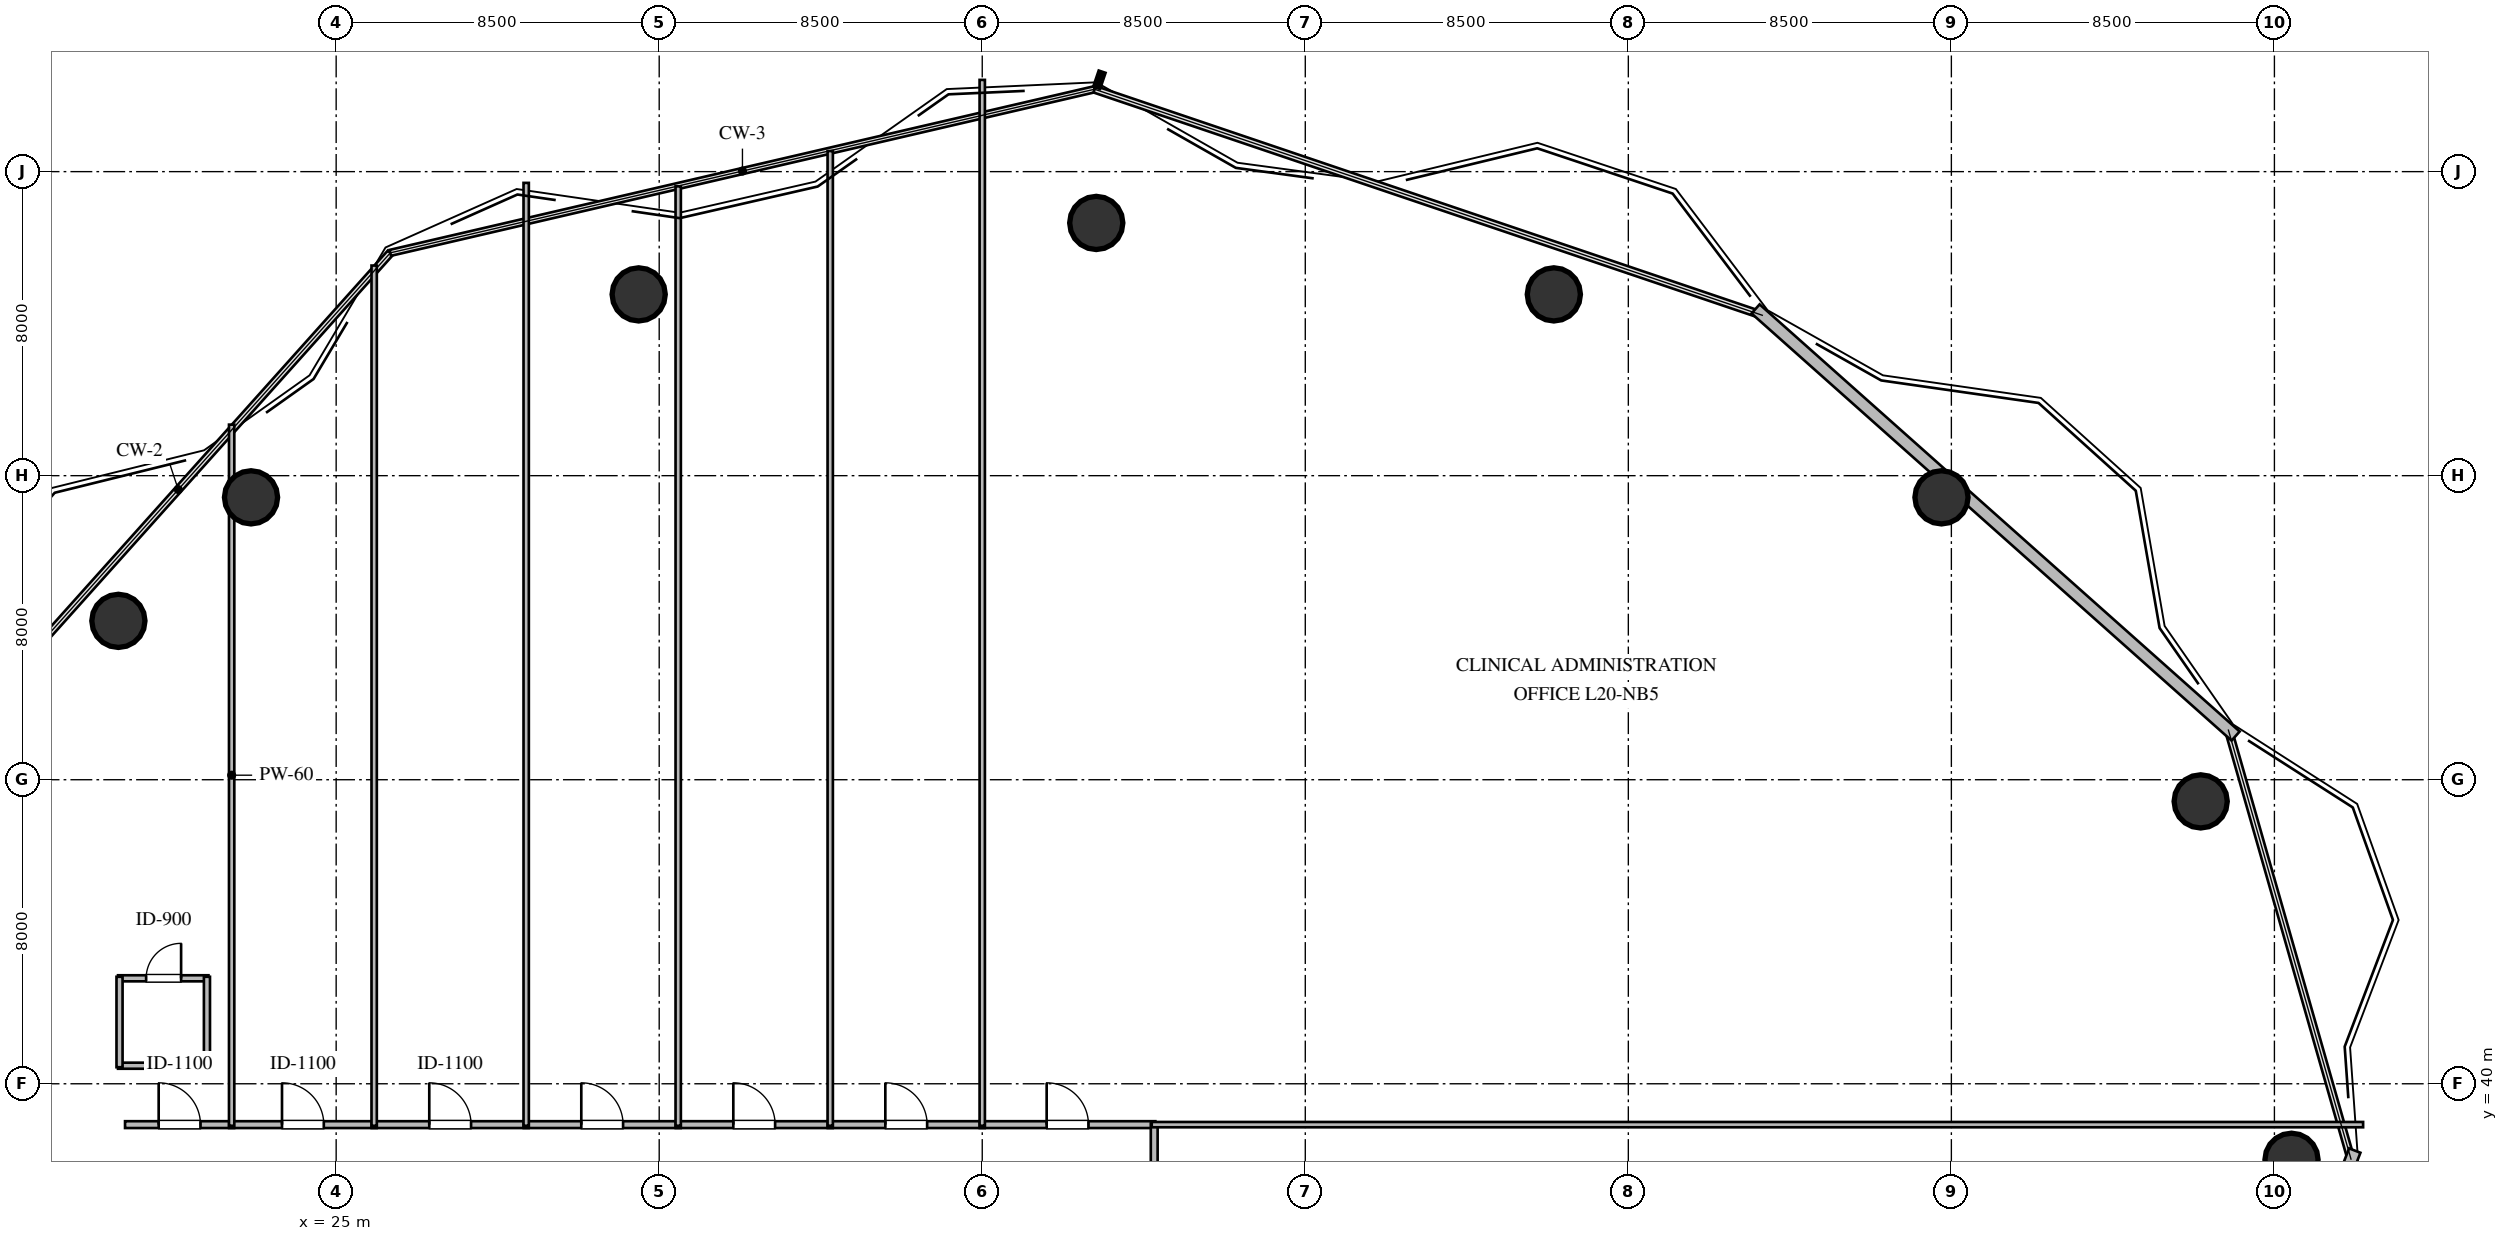
"""IFC4 building model, lengths in metres.
Left out: names, types, materials, properties, quantities, classifications, styles, units other than length and angle.
Written with IfcOpenShell. Run it as: python <this file> out.ifc"""

import sys

from ifc_helpers import new_model, si_unit, direction, frame, frame_2d, origin, origin_2d, place, context, subcontext, project, spatial, rectangle, circle, extrude, element, fill, save


model = new_model("IFC4")
c1 = context("Model", 3, precision=1e-05, world=origin(), true_north=direction((0.0, 1.0)))
c2 = subcontext(c1, "Body", "Model", "MODEL_VIEW")
j1 = project(units=[si_unit("LENGTHUNIT", "METRE"), si_unit("PLANEANGLEUNIT", "RADIAN")], contexts=[c1])
p1 = place(None, origin())
s1 = spatial("IfcSite", under=j1, at=p1, CompositionType="ELEMENT")
p2 = place(p1, origin())
s2 = spatial("IfcBuilding", under=s1, at=p2, CompositionType="ELEMENT")
p3 = place(p2, frame((0.0, 0.0, 78.0)))
s3 = spatial("IfcBuildingStorey", under=s2, at=p3, CompositionType="ELEMENT", Elevation=78.0)
for number, where, z_axis, x_axis in (
    (1, (76.45, 38.0, 0.0), (0.0, 0.0, 1.0), (1.0, 0.0, 0.0)),
    (2, (74.06, 47.43, 0.0), (0.0, 0.0, 1.0), (1.0, 0.0, 0.0)),
    (3, (67.24, 55.43, 0.0), (0.0, 0.0, 1.0), (1.0, 0.0, 0.0)),
    (4, (57.04, 60.77, 0.0), (0.0, 0.0, 1.0), (1.0, 0.0, 0.0)),
    (5, (45.0, 62.65, 0.0), (0.0, 0.0, 1.0), (1.0, 0.0, 0.0)),
    (6, (32.96, 60.77, 0.0), (0.0, 0.0, 1.0), (1.0, 0.0, 0.0)),
    (7, (22.76, 55.43, 0.0), (0.0, 0.0, 1.0), (1.0, 0.0, 0.0)),
    (8, (19.27, 52.18, 0.0), (0.0, 0.0, 1.0), (1.0, 0.0, 0.0)),
):
    element("IfcColumn", number, at=place(p3, frame(where, z_axis=z_axis, x_axis=x_axis)), inside=s3, PredefinedType="COLUMN", context=c2, shape_type="SweptSolid", body=[
        extrude(circle(Radius=0.7, at=origin_2d()), origin(), (0.0, 0.0, 1.0), 3.6),
    ])
p4 = place(p3, frame((78.114, 38.243, 0.0), z_axis=(0.0, 0.0, 1.0), x_axis=(-0.360517110943, -0.932752599952, 0.0)))
e9 = element("IfcWall", 9, at=p4, inside=s3, PredefinedType="STANDARD", context=c2, shape_type="SweptSolid", body=[
    extrude(rectangle(XDim=14.504, YDim=0.32, at=frame_2d((7.252, 0.0))), origin(), (0.0, 0.0, 1.0), 2.738),
])
p5 = place(p3, frame((62.348, 60.388, 0.0), z_axis=(0.0, 0.0, 1.0), x_axis=(0.747075414442, -0.664739291104, 0.0)))
e10 = element("IfcWall", 10, at=p5, inside=s3, PredefinedType="STANDARD", context=c2, shape_type="SweptSolid", body=[
    extrude(rectangle(XDim=16.907, YDim=0.32, at=frame_2d((8.454, 0.0))), origin(), (0.0, 0.0, 1.0), 3.36),
])
p6 = place(p3, frame((19.26, 40.475, 0.0), z_axis=(0.0, 0.0, 1.0), x_axis=(1.0, 0.0, 0.0)))
e11 = element("IfcWall", 11, at=p6, inside=s3, PredefinedType="PLUMBINGWALL", context=c2, shape_type="SweptSolid", body=[
    extrude(rectangle(XDim=2.38, YDim=0.16, at=frame_2d((1.19, 0.0))), origin(), (0.0, 0.0, 1.0), 3.36),
])
p7 = place(p3, frame((19.26, 42.775, 0.0), z_axis=(0.0, 0.0, 1.0), x_axis=(1.0, 0.0, 0.0)))
e12 = element("IfcWall", 12, at=p7, inside=s3, PredefinedType="PLUMBINGWALL", context=c2, shape_type="SweptSolid", body=[
    extrude(rectangle(XDim=2.38, YDim=0.16, at=frame_2d((1.19, 0.0))), origin(), (0.0, 0.0, 1.0), 3.36),
])
p8 = place(p7, frame((0.74, 0.0, 0.0)))
e13 = element("IfcOpeningElement", 13, at=p8, cuts=e12, PredefinedType="OPENING", context=c2, shape_type="SweptSolid", body=[
    extrude(rectangle(XDim=0.92, YDim=2.1, at=frame_2d((0.46, 1.05))), frame((0.0, 0.09, 0.0), z_axis=(0.0, -1.0, 0.0), x_axis=(1.0, 0.0, 0.0)), (0.0, 0.0, 1.0), 0.18),
])
p9 = place(p3, frame((19.3, 40.435, 0.0), z_axis=(0.0, 0.0, 1.0), x_axis=(0.0, 1.0, 0.0)))
e14 = element("IfcWall", 14, at=p9, inside=s3, PredefinedType="PLUMBINGWALL", context=c2, shape_type="SweptSolid", body=[
    extrude(rectangle(XDim=2.38, YDim=0.16, at=frame_2d((1.19, 0.0))), origin(), (0.0, 0.0, 1.0), 3.36),
])
p10 = place(p3, frame((21.6, 40.435, 0.0), z_axis=(0.0, 0.0, 1.0), x_axis=(0.0, 1.0, 0.0)))
e15 = element("IfcWall", 15, at=p10, inside=s3, PredefinedType="PLUMBINGWALL", context=c2, shape_type="SweptSolid", body=[
    extrude(rectangle(XDim=2.38, YDim=0.16, at=frame_2d((1.19, 0.0))), origin(), (0.0, 0.0, 1.0), 2.806),
])
p11 = place(p3, frame((19.445, 38.925, 0.0), z_axis=(0.0, 0.0, 1.0), x_axis=(1.0, 0.0, 0.0)))
e16 = element("IfcWall", 16, at=p11, inside=s3, PredefinedType="PARTITIONING", context=c2, shape_type="SweptSolid", body=[
    extrude(rectangle(XDim=2.87, YDim=0.18, at=frame_2d((1.435, 0.0))), origin(), (0.0, 0.0, 1.0), 3.36),
])
p12 = place(p11, frame((0.885, 0.0, 0.0)))
e17 = element("IfcOpeningElement", 17, at=p12, cuts=e16, PredefinedType="OPENING", context=c2, shape_type="SweptSolid", body=[
    extrude(rectangle(XDim=1.1, YDim=2.1, at=frame_2d((0.55, 1.05))), frame((0.0, 0.1, 0.0), z_axis=(0.0, -1.0, 0.0), x_axis=(1.0, 0.0, 0.0)), (0.0, 0.0, 1.0), 0.2),
])
p13 = place(p3, frame((22.185, 38.925, 0.0), z_axis=(0.0, 0.0, 1.0), x_axis=(1.0, 0.0, 0.0)))
e18 = element("IfcWall", 18, at=p13, inside=s3, PredefinedType="PARTITIONING", context=c2, shape_type="SweptSolid", body=[
    extrude(rectangle(XDim=3.88, YDim=0.18, at=frame_2d((1.94, 0.0))), origin(), (0.0, 0.0, 1.0), 3.36),
])
p14 = place(p13, frame((1.39, 0.0, 0.0)))
e19 = element("IfcOpeningElement", 19, at=p14, cuts=e18, PredefinedType="OPENING", context=c2, shape_type="SweptSolid", body=[
    extrude(rectangle(XDim=1.1, YDim=2.1, at=frame_2d((0.55, 1.05))), frame((0.0, 0.1, 0.0), z_axis=(0.0, -1.0, 0.0), x_axis=(1.0, 0.0, 0.0)), (0.0, 0.0, 1.0), 0.2),
])
p15 = place(p3, frame((25.935, 38.925, 0.0), z_axis=(0.0, 0.0, 1.0), x_axis=(1.0, 0.0, 0.0)))
e20 = element("IfcWall", 20, at=p15, inside=s3, PredefinedType="PARTITIONING", context=c2, shape_type="SweptSolid", body=[
    extrude(rectangle(XDim=4.13, YDim=0.18, at=frame_2d((2.065, 0.0))), origin(), (0.0, 0.0, 1.0), 3.36),
])
p16 = place(p15, frame((1.515, 0.0, 0.0)))
e21 = element("IfcOpeningElement", 21, at=p16, cuts=e20, PredefinedType="OPENING", context=c2, shape_type="SweptSolid", body=[
    extrude(rectangle(XDim=1.1, YDim=2.1, at=frame_2d((0.55, 1.05))), frame((0.0, 0.1, 0.0), z_axis=(0.0, -1.0, 0.0), x_axis=(1.0, 0.0, 0.0)), (0.0, 0.0, 1.0), 0.2),
])
p17 = place(p3, frame((29.935, 38.925, 0.0), z_axis=(0.0, 0.0, 1.0), x_axis=(1.0, 0.0, 0.0)))
e22 = element("IfcWall", 22, at=p17, inside=s3, PredefinedType="PARTITIONING", context=c2, shape_type="SweptSolid", body=[
    extrude(rectangle(XDim=4.13, YDim=0.18, at=frame_2d((2.065, 0.0))), origin(), (0.0, 0.0, 1.0), 3.36),
])
p18 = place(p17, frame((1.515, 0.0, 0.0)))
e23 = element("IfcOpeningElement", 23, at=p18, cuts=e22, PredefinedType="OPENING", context=c2, shape_type="SweptSolid", body=[
    extrude(rectangle(XDim=1.1, YDim=2.1, at=frame_2d((0.55, 1.05))), frame((0.0, 0.1, 0.0), z_axis=(0.0, -1.0, 0.0), x_axis=(1.0, 0.0, 0.0)), (0.0, 0.0, 1.0), 0.2),
])
p19 = place(p3, frame((33.935, 38.925, 0.0), z_axis=(0.0, 0.0, 1.0), x_axis=(1.0, 0.0, 0.0)))
e24 = element("IfcWall", 24, at=p19, inside=s3, PredefinedType="PARTITIONING", context=c2, shape_type="SweptSolid", body=[
    extrude(rectangle(XDim=4.13, YDim=0.18, at=frame_2d((2.065, 0.0))), origin(), (0.0, 0.0, 1.0), 3.36),
])
p20 = place(p19, frame((1.515, 0.0, 0.0)))
e25 = element("IfcOpeningElement", 25, at=p20, cuts=e24, PredefinedType="OPENING", context=c2, shape_type="SweptSolid", body=[
    extrude(rectangle(XDim=1.1, YDim=2.1, at=frame_2d((0.55, 1.05))), frame((0.0, 0.1, 0.0), z_axis=(0.0, -1.0, 0.0), x_axis=(1.0, 0.0, 0.0)), (0.0, 0.0, 1.0), 0.2),
])
p21 = place(p3, frame((37.935, 38.925, 0.0), z_axis=(0.0, 0.0, 1.0), x_axis=(1.0, 0.0, 0.0)))
e26 = element("IfcWall", 26, at=p21, inside=s3, PredefinedType="PARTITIONING", context=c2, shape_type="SweptSolid", body=[
    extrude(rectangle(XDim=4.13, YDim=0.18, at=frame_2d((2.065, 0.0))), origin(), (0.0, 0.0, 1.0), 3.36),
])
p22 = place(p21, frame((1.515, 0.0, 0.0)))
e27 = element("IfcOpeningElement", 27, at=p22, cuts=e26, PredefinedType="OPENING", context=c2, shape_type="SweptSolid", body=[
    extrude(rectangle(XDim=1.1, YDim=2.1, at=frame_2d((0.55, 1.05))), frame((0.0, 0.1, 0.0), z_axis=(0.0, -1.0, 0.0), x_axis=(1.0, 0.0, 0.0)), (0.0, 0.0, 1.0), 0.2),
])
p23 = place(p3, frame((41.935, 38.925, 0.0), z_axis=(0.0, 0.0, 1.0), x_axis=(1.0, 0.0, 0.0)))
e28 = element("IfcWall", 28, at=p23, inside=s3, PredefinedType="PARTITIONING", context=c2, shape_type="SweptSolid", body=[
    extrude(rectangle(XDim=4.62, YDim=0.18, at=frame_2d((2.31, 0.0))), origin(), (0.0, 0.0, 1.0), 3.36),
])
p24 = place(p23, frame((1.76, 0.0, 0.0)))
e29 = element("IfcOpeningElement", 29, at=p24, cuts=e28, PredefinedType="OPENING", context=c2, shape_type="SweptSolid", body=[
    extrude(rectangle(XDim=1.1, YDim=2.1, at=frame_2d((0.55, 1.05))), frame((0.0, 0.1, 0.0), z_axis=(0.0, -1.0, 0.0), x_axis=(1.0, 0.0, 0.0)), (0.0, 0.0, 1.0), 0.2),
])
p25 = place(p3, frame((46.525, 38.955, 0.0), z_axis=(0.0, 0.0, 1.0), x_axis=(0.0, -1.0, 0.0)))
e30 = element("IfcWall", 30, at=p25, inside=s3, PredefinedType="PARTITIONING", context=c2, shape_type="SweptSolid", body=[
    extrude(rectangle(XDim=4.31, YDim=0.18, at=frame_2d((2.155, 0.0))), origin(), (0.0, 0.0, 1.0), 3.36),
])
p26 = place(p25, frame((1.605, 0.0, 0.0)))
e31 = element("IfcOpeningElement", 31, at=p26, cuts=e30, PredefinedType="OPENING", context=c2, shape_type="SweptSolid", body=[
    extrude(rectangle(XDim=1.1, YDim=2.1, at=frame_2d((0.55, 1.05))), frame((0.0, 0.1, 0.0), z_axis=(0.0, -1.0, 0.0), x_axis=(1.0, 0.0, 0.0)), (0.0, 0.0, 1.0), 0.2),
])
p27 = place(p3, frame((22.25, 57.343, 0.0), z_axis=(0.0, 0.0, 1.0), x_axis=(0.0, -1.0, 0.0)))
e32 = element("IfcWall", 32, at=p27, inside=s3, PredefinedType="PARTITIONING", context=c2, shape_type="SweptSolid", body=[
    extrude(rectangle(XDim=18.448, YDim=0.14, at=frame_2d((9.224, 0.0))), origin(), (0.0, 0.0, 1.0), 2.806),
])
p28 = place(p3, frame((26.0, 61.529, 0.0), z_axis=(0.0, 0.0, 1.0), x_axis=(0.0, -1.0, 0.0)))
e33 = element("IfcWall", 33, at=p28, inside=s3, PredefinedType="PARTITIONING", context=c2, shape_type="SweptSolid", body=[
    extrude(rectangle(XDim=22.634, YDim=0.14, at=frame_2d((11.317, 0.0))), origin(), (0.0, 0.0, 1.0), 3.36),
])
p29 = place(p3, frame((30.0, 63.704, 0.0), z_axis=(0.0, 0.0, 1.0), x_axis=(0.0, -1.0, 0.0)))
e34 = element("IfcWall", 34, at=p29, inside=s3, PredefinedType="PARTITIONING", context=c2, shape_type="SweptSolid", body=[
    extrude(rectangle(XDim=24.809, YDim=0.14, at=frame_2d((12.405, 0.0))), origin(), (0.0, 0.0, 1.0), 2.806),
])
p30 = place(p3, frame((34.0, 63.613, 0.0), z_axis=(0.0, 0.0, 1.0), x_axis=(0.0, -1.0, 0.0)))
e35 = element("IfcWall", 35, at=p30, inside=s3, PredefinedType="PARTITIONING", context=c2, shape_type="SweptSolid", body=[
    extrude(rectangle(XDim=24.718, YDim=0.14, at=frame_2d((12.359, 0.0))), origin(), (0.0, 0.0, 1.0), 3.36),
])
p31 = place(p3, frame((38.0, 64.542, 0.0), z_axis=(0.0, 0.0, 1.0), x_axis=(0.0, -1.0, 0.0)))
e36 = element("IfcWall", 36, at=p31, inside=s3, PredefinedType="PARTITIONING", context=c2, shape_type="SweptSolid", body=[
    extrude(rectangle(XDim=25.647, YDim=0.14, at=frame_2d((12.823, 0.0))), origin(), (0.0, 0.0, 1.0), 3.36),
])
p32 = place(p3, frame((42.0, 66.414, 0.0), z_axis=(0.0, 0.0, 1.0), x_axis=(0.0, -1.0, 0.0)))
e37 = element("IfcWall", 37, at=p32, inside=s3, PredefinedType="PARTITIONING", context=c2, shape_type="SweptSolid", body=[
    extrude(rectangle(XDim=27.519, YDim=0.14, at=frame_2d((13.76, 0.0))), origin(), (0.0, 0.0, 1.0), 3.36),
])
p33 = place(p3, frame((78.334, 38.925, 0.0), z_axis=(0.0, 0.0, 1.0), x_axis=(-1.0, 0.0, 0.0)))
e38 = element("IfcWall", 38, at=p33, inside=s3, PredefinedType="PARTITIONING", context=c2, shape_type="SweptSolid", body=[
    extrude(rectangle(XDim=31.874, YDim=0.14, at=frame_2d((15.937, 0.0))), origin(), (0.0, 0.0, 1.0), 3.36),
])
p34 = place(p8, origin())
e39 = element("IfcDoor", 39, at=p34, inside=s3, OperationType="SINGLE_SWING_RIGHT", PredefinedType="DOOR", context=c2, shape_type="SweptSolid", body=[
    extrude(rectangle(XDim=0.92, YDim=2.1, at=frame_2d((0.46, 1.05))), frame((0.0, 0.025, 0.0), z_axis=(0.0, -1.0, 0.0), x_axis=(1.0, 0.0, 0.0)), (0.0, 0.0, 1.0), 0.05),
])
fill(e13, e39)
p35 = place(p12, origin())
e40 = element("IfcDoor", 40, at=p35, inside=s3, OperationType="SINGLE_SWING_LEFT", PredefinedType="DOOR", context=c2, shape_type="SweptSolid", body=[
    extrude(rectangle(XDim=1.1, YDim=2.1, at=frame_2d((0.55, 1.05))), frame((0.0, 0.025, 0.0), z_axis=(0.0, -1.0, 0.0), x_axis=(1.0, 0.0, 0.0)), (0.0, 0.0, 1.0), 0.05),
])
fill(e17, e40)
p36 = place(p14, origin())
e41 = element("IfcDoor", 41, at=p36, inside=s3, OperationType="SINGLE_SWING_LEFT", PredefinedType="DOOR", context=c2, shape_type="SweptSolid", body=[
    extrude(rectangle(XDim=1.1, YDim=2.1, at=frame_2d((0.55, 1.05))), frame((0.0, 0.025, 0.0), z_axis=(0.0, -1.0, 0.0), x_axis=(1.0, 0.0, 0.0)), (0.0, 0.0, 1.0), 0.05),
])
fill(e19, e41)
p37 = place(p16, origin())
e42 = element("IfcDoor", 42, at=p37, inside=s3, OperationType="SINGLE_SWING_LEFT", PredefinedType="DOOR", context=c2, shape_type="SweptSolid", body=[
    extrude(rectangle(XDim=1.1, YDim=2.1, at=frame_2d((0.55, 1.05))), frame((0.0, 0.025, 0.0), z_axis=(0.0, -1.0, 0.0), x_axis=(1.0, 0.0, 0.0)), (0.0, 0.0, 1.0), 0.05),
])
fill(e21, e42)
p38 = place(p18, origin())
e43 = element("IfcDoor", 43, at=p38, inside=s3, OperationType="SINGLE_SWING_LEFT", PredefinedType="DOOR", context=c2, shape_type="SweptSolid", body=[
    extrude(rectangle(XDim=1.1, YDim=2.1, at=frame_2d((0.55, 1.05))), frame((0.0, 0.025, 0.0), z_axis=(0.0, -1.0, 0.0), x_axis=(1.0, 0.0, 0.0)), (0.0, 0.0, 1.0), 0.05),
])
fill(e23, e43)
p39 = place(p20, origin())
e44 = element("IfcDoor", 44, at=p39, inside=s3, OperationType="SINGLE_SWING_LEFT", PredefinedType="DOOR", context=c2, shape_type="SweptSolid", body=[
    extrude(rectangle(XDim=1.1, YDim=2.1, at=frame_2d((0.55, 1.05))), frame((0.0, 0.025, 0.0), z_axis=(0.0, -1.0, 0.0), x_axis=(1.0, 0.0, 0.0)), (0.0, 0.0, 1.0), 0.05),
])
fill(e25, e44)
p40 = place(p22, origin())
e45 = element("IfcDoor", 45, at=p40, inside=s3, OperationType="SINGLE_SWING_LEFT", PredefinedType="DOOR", context=c2, shape_type="SweptSolid", body=[
    extrude(rectangle(XDim=1.1, YDim=2.1, at=frame_2d((0.55, 1.05))), frame((0.0, 0.025, 0.0), z_axis=(0.0, -1.0, 0.0), x_axis=(1.0, 0.0, 0.0)), (0.0, 0.0, 1.0), 0.05),
])
fill(e27, e45)
p41 = place(p24, origin())
e46 = element("IfcDoor", 46, at=p41, inside=s3, OperationType="SINGLE_SWING_LEFT", PredefinedType="DOOR", context=c2, shape_type="SweptSolid", body=[
    extrude(rectangle(XDim=1.1, YDim=2.1, at=frame_2d((0.55, 1.05))), frame((0.0, 0.025, 0.0), z_axis=(0.0, -1.0, 0.0), x_axis=(1.0, 0.0, 0.0)), (0.0, 0.0, 1.0), 0.05),
])
fill(e29, e46)
save(model, sys.argv[1])
